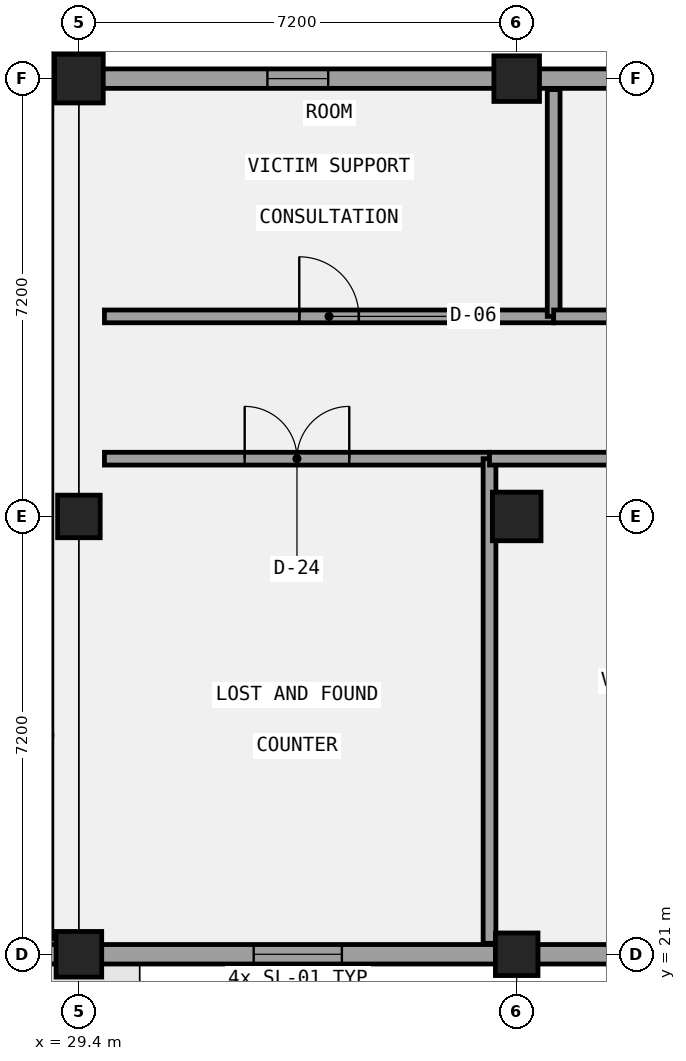
"""IFC4 building model, lengths in metres.
Left out: names, types, materials, properties, quantities, classifications, styles, units other than length and angle.
Written with IfcOpenShell. Run it as: python <this file> out.ifc"""

import sys

from ifc_helpers import new_model, si_unit, direction, frame, frame_2d, origin, origin_2d, place, context, subcontext, project, spatial, rectangle, circle, extrude, element, fill, save


model = new_model("IFC4")
c1 = context("Model", 3, precision=1e-05, world=origin(), true_north=direction((0.0, 1.0)))
c2 = subcontext(c1, "Body", "Model", "MODEL_VIEW")
j1 = project(units=[si_unit("LENGTHUNIT", "METRE"), si_unit("PLANEANGLEUNIT", "RADIAN")], contexts=[c1])
p1 = place(None, origin())
s1 = spatial("IfcSite", under=j1, at=p1, CompositionType="ELEMENT")
p2 = place(p1, origin())
s2 = spatial("IfcBuilding", under=s1, at=p2, CompositionType="ELEMENT")
p3 = place(p2, origin())
s3 = spatial("IfcBuildingStorey", under=s2, at=p3, CompositionType="ELEMENT", Elevation=0.0)
p4 = place(p3, frame((29.4, 21.0, 0.0), z_axis=(0.0, 0.0, 1.0), x_axis=(1.0, 0.0, 0.0)))
e1 = element("IfcColumn", 1, at=p4, inside=s3, PredefinedType="COLUMN", context=c2, shape_type="SweptSolid", body=[
    extrude(rectangle(XDim=0.75, YDim=0.75, at=origin_2d()), origin(), (0.0, 0.0, 1.0), 5.4),
])
p5 = place(p3, frame((29.4, 28.2, 0.0), z_axis=(0.0, 0.0, 1.0), x_axis=(1.0, 0.0, 0.0)))
e2 = element("IfcColumn", 2, at=p5, inside=s3, PredefinedType="COLUMN", context=c2, shape_type="SweptSolid", body=[
    extrude(rectangle(XDim=0.7, YDim=0.7, at=origin_2d()), origin(), (0.0, 0.0, 1.0), 5.4),
])
p6 = place(p3, frame((29.4, 35.4, 0.0), z_axis=(0.0, 0.0, 1.0), x_axis=(1.0, 0.0, 0.0)))
e3 = element("IfcColumn", 3, at=p6, inside=s3, PredefinedType="COLUMN", context=c2, shape_type="SweptSolid", body=[
    extrude(circle(Radius=0.4, at=origin_2d()), origin(), (0.0, 0.0, 1.0), 5.4),
])
p7 = place(p3, frame((36.6, 21.0, 0.0), z_axis=(0.0, 0.0, 1.0), x_axis=(1.0, 0.0, 0.0)))
e4 = element("IfcColumn", 4, at=p7, inside=s3, PredefinedType="COLUMN", context=c2, shape_type="SweptSolid", body=[
    extrude(rectangle(XDim=0.7, YDim=0.7, at=origin_2d()), origin(), (0.0, 0.0, 1.0), 5.4),
])
p8 = place(p3, frame((36.6, 28.2, 0.0), z_axis=(0.0, 0.0, 1.0), x_axis=(1.0, 0.0, 0.0)))
e5 = element("IfcColumn", 5, at=p8, inside=s3, PredefinedType="COLUMN", context=c2, shape_type="SweptSolid", body=[
    extrude(rectangle(XDim=0.8, YDim=0.8, at=origin_2d()), origin(), (0.0, 0.0, 1.0), 5.4),
])
p9 = place(p3, frame((36.6, 35.4, 0.0), z_axis=(0.0, 0.0, 1.0), x_axis=(1.0, 0.0, 0.0)))
e6 = element("IfcColumn", 6, at=p9, inside=s3, PredefinedType="COLUMN", context=c2, shape_type="SweptSolid", body=[
    extrude(rectangle(XDim=0.75, YDim=0.75, at=origin_2d()), origin(), (0.0, 0.0, 1.0), 5.4),
])
p10 = place(p3, frame((-0.16, 21.0, 0.0), z_axis=(0.0, 0.0, 1.0), x_axis=(1.0, 0.0, 0.0)))
e7 = element("IfcWall", 7, at=p10, inside=s3, PredefinedType="SOLIDWALL", context=c2, shape_type="SweptSolid", body=[
    extrude(rectangle(XDim=29.72, YDim=0.32, at=frame_2d((14.86, 0.0))), origin(), (0.0, 0.0, 1.0), 3.35),
])
p11 = place(p10, frame((23.56, 0.0, 0.0)))
e8 = element("IfcOpeningElement", 8, at=p11, cuts=e7, PredefinedType="OPENING", context=c2, shape_type="SweptSolid", body=[
    extrude(rectangle(XDim=4.8, YDim=3.1, at=frame_2d((2.4, 1.55))), frame((0.0, 0.17, 0.0), z_axis=(0.0, -1.0, 0.0), x_axis=(1.0, 0.0, 0.0)), (0.0, 0.0, 1.0), 0.34),
])
p12 = place(p10, frame((3.335, 0.0, 1.0)))
e9 = element("IfcOpeningElement", 9, at=p12, cuts=e7, PredefinedType="OPENING", context=c2, shape_type="SweptSolid", body=[
    extrude(rectangle(XDim=1.45, YDim=1.4, at=frame_2d((0.725, 0.7))), frame((0.0, 0.17, 0.0), z_axis=(0.0, -1.0, 0.0), x_axis=(1.0, 0.0, 0.0)), (0.0, 0.0, 1.0), 0.34),
])
p13 = place(p10, frame((10.835, 0.0, 1.0)))
e10 = element("IfcOpeningElement", 10, at=p13, cuts=e7, PredefinedType="OPENING", context=c2, shape_type="SweptSolid", body=[
    extrude(rectangle(XDim=1.45, YDim=1.4, at=frame_2d((0.725, 0.7))), frame((0.0, 0.17, 0.0), z_axis=(0.0, -1.0, 0.0), x_axis=(1.0, 0.0, 0.0)), (0.0, 0.0, 1.0), 0.34),
])
p14 = place(p10, frame((18.035, 0.0, 1.0)))
e11 = element("IfcOpeningElement", 11, at=p14, cuts=e7, PredefinedType="OPENING", context=c2, shape_type="SweptSolid", body=[
    extrude(rectangle(XDim=1.45, YDim=1.4, at=frame_2d((0.725, 0.7))), frame((0.0, 0.17, 0.0), z_axis=(0.0, -1.0, 0.0), x_axis=(1.0, 0.0, 0.0)), (0.0, 0.0, 1.0), 0.34),
])
p15 = place(p3, frame((29.24, 21.0, 0.0), z_axis=(0.0, 0.0, 1.0), x_axis=(1.0, 0.0, 0.0)))
e12 = element("IfcWall", 12, at=p15, inside=s3, PredefinedType="SOLIDWALL", context=c2, shape_type="SweptSolid", body=[
    extrude(rectangle(XDim=50.72, YDim=0.32, at=frame_2d((25.36, 0.0))), origin(), (0.0, 0.0, 1.0), 3.35),
])
p16 = place(p15, frame((24.36, 0.0, 0.0)))
e13 = element("IfcOpeningElement", 13, at=p16, cuts=e12, PredefinedType="OPENING", context=c2, shape_type="SweptSolid", body=[
    extrude(rectangle(XDim=2.0, YDim=2.6, at=frame_2d((1.0, 1.3))), frame((0.0, 0.17, 0.0), z_axis=(0.0, -1.0, 0.0), x_axis=(1.0, 0.0, 0.0)), (0.0, 0.0, 1.0), 0.34),
])
p17 = place(p15, frame((3.035, 0.0, 1.0)))
e14 = element("IfcOpeningElement", 14, at=p17, cuts=e12, PredefinedType="OPENING", context=c2, shape_type="SweptSolid", body=[
    extrude(rectangle(XDim=1.45, YDim=1.65, at=frame_2d((0.725, 0.825))), frame((0.0, 0.17, 0.0), z_axis=(0.0, -1.0, 0.0), x_axis=(1.0, 0.0, 0.0)), (0.0, 0.0, 1.0), 0.34),
])
p18 = place(p15, frame((10.235, 0.0, 1.0)))
e15 = element("IfcOpeningElement", 15, at=p18, cuts=e12, PredefinedType="OPENING", context=c2, shape_type="SweptSolid", body=[
    extrude(rectangle(XDim=1.45, YDim=1.65, at=frame_2d((0.725, 0.825))), frame((0.0, 0.17, 0.0), z_axis=(0.0, -1.0, 0.0), x_axis=(1.0, 0.0, 0.0)), (0.0, 0.0, 1.0), 0.34),
])
p19 = place(p15, frame((17.435, 0.0, 1.0)))
e16 = element("IfcOpeningElement", 16, at=p19, cuts=e12, PredefinedType="OPENING", context=c2, shape_type="SweptSolid", body=[
    extrude(rectangle(XDim=1.45, YDim=1.65, at=frame_2d((0.725, 0.825))), frame((0.0, 0.17, 0.0), z_axis=(0.0, -1.0, 0.0), x_axis=(1.0, 0.0, 0.0)), (0.0, 0.0, 1.0), 0.34),
])
p20 = place(p15, frame((31.835, 0.0, 1.0)))
e17 = element("IfcOpeningElement", 17, at=p20, cuts=e12, PredefinedType="OPENING", context=c2, shape_type="SweptSolid", body=[
    extrude(rectangle(XDim=1.45, YDim=1.65, at=frame_2d((0.725, 0.825))), frame((0.0, 0.17, 0.0), z_axis=(0.0, -1.0, 0.0), x_axis=(1.0, 0.0, 0.0)), (0.0, 0.0, 1.0), 0.34),
])
p21 = place(p15, frame((39.035, 0.0, 1.0)))
e18 = element("IfcOpeningElement", 18, at=p21, cuts=e12, PredefinedType="OPENING", context=c2, shape_type="SweptSolid", body=[
    extrude(rectangle(XDim=1.45, YDim=1.65, at=frame_2d((0.725, 0.825))), frame((0.0, 0.17, 0.0), z_axis=(0.0, -1.0, 0.0), x_axis=(1.0, 0.0, 0.0)), (0.0, 0.0, 1.0), 0.34),
])
p22 = place(p15, frame((46.235, 0.0, 1.0)))
e19 = element("IfcOpeningElement", 19, at=p22, cuts=e12, PredefinedType="OPENING", context=c2, shape_type="SweptSolid", body=[
    extrude(rectangle(XDim=1.45, YDim=1.65, at=frame_2d((0.725, 0.825))), frame((0.0, 0.17, 0.0), z_axis=(0.0, -1.0, 0.0), x_axis=(1.0, 0.0, 0.0)), (0.0, 0.0, 1.0), 0.34),
])
p23 = place(p3, frame((29.4, 35.56, 0.0), z_axis=(0.0, 0.0, 1.0), x_axis=(0.0, 1.0, 0.0)))
e20 = element("IfcWall", 20, at=p23, inside=s3, PredefinedType="SOLIDWALL", context=c2, shape_type="SweptSolid", body=[
    extrude(rectangle(XDim=21.28, YDim=0.32, at=frame_2d((10.64, 0.0))), origin(), (0.0, 0.0, 1.0), 4.22),
])
p24 = place(p23, frame((3.095, 0.0, 1.0)))
e21 = element("IfcOpeningElement", 21, at=p24, cuts=e20, PredefinedType="OPENING", context=c2, shape_type="SweptSolid", body=[
    extrude(rectangle(XDim=0.85, YDim=2.15, at=frame_2d((0.425, 1.075))), frame((0.0, 0.17, 0.0), z_axis=(0.0, -1.0, 0.0), x_axis=(1.0, 0.0, 0.0)), (0.0, 0.0, 1.0), 0.34),
])
p25 = place(p23, frame((10.215, 0.0, 1.0)))
e22 = element("IfcOpeningElement", 22, at=p25, cuts=e20, PredefinedType="OPENING", context=c2, shape_type="SweptSolid", body=[
    extrude(rectangle(XDim=0.85, YDim=2.15, at=frame_2d((0.425, 1.075))), frame((0.0, 0.17, 0.0), z_axis=(0.0, -1.0, 0.0), x_axis=(1.0, 0.0, 0.0)), (0.0, 0.0, 1.0), 0.34),
])
p26 = place(p23, frame((17.335, 0.0, 1.0)))
e23 = element("IfcOpeningElement", 23, at=p26, cuts=e20, PredefinedType="OPENING", context=c2, shape_type="SweptSolid", body=[
    extrude(rectangle(XDim=0.85, YDim=2.15, at=frame_2d((0.425, 1.075))), frame((0.0, 0.17, 0.0), z_axis=(0.0, -1.0, 0.0), x_axis=(1.0, 0.0, 0.0)), (0.0, 0.0, 1.0), 0.34),
])
p27 = place(p3, frame((72.76, 35.4, 0.0), z_axis=(0.0, 0.0, 1.0), x_axis=(-1.0, 0.0, 0.0)))
e24 = element("IfcWall", 24, at=p27, inside=s3, PredefinedType="SOLIDWALL", context=c2, shape_type="SweptSolid", body=[
    extrude(rectangle(XDim=43.52, YDim=0.32, at=frame_2d((21.76, 0.0))), origin(), (0.0, 0.0, 1.0), 4.12),
])
p28 = place(p27, frame((39.26, 0.0, 1.0)))
e25 = element("IfcOpeningElement", 25, at=p28, cuts=e24, PredefinedType="OPENING", context=c2, shape_type="SweptSolid", body=[
    extrude(rectangle(XDim=1.0, YDim=1.9, at=frame_2d((0.5, 0.95))), frame((0.0, 0.17, 0.0), z_axis=(0.0, -1.0, 0.0), x_axis=(1.0, 0.0, 0.0)), (0.0, 0.0, 1.0), 0.34),
])
p29 = place(p27, frame((32.06, 0.0, 1.0)))
e26 = element("IfcOpeningElement", 26, at=p29, cuts=e24, PredefinedType="OPENING", context=c2, shape_type="SweptSolid", body=[
    extrude(rectangle(XDim=1.0, YDim=1.9, at=frame_2d((0.5, 0.95))), frame((0.0, 0.17, 0.0), z_axis=(0.0, -1.0, 0.0), x_axis=(1.0, 0.0, 0.0)), (0.0, 0.0, 1.0), 0.34),
])
p30 = place(p27, frame((24.86, 0.0, 1.0)))
e27 = element("IfcOpeningElement", 27, at=p30, cuts=e24, PredefinedType="OPENING", context=c2, shape_type="SweptSolid", body=[
    extrude(rectangle(XDim=1.0, YDim=1.9, at=frame_2d((0.5, 0.95))), frame((0.0, 0.17, 0.0), z_axis=(0.0, -1.0, 0.0), x_axis=(1.0, 0.0, 0.0)), (0.0, 0.0, 1.0), 0.34),
])
p31 = place(p27, frame((17.66, 0.0, 1.0)))
e28 = element("IfcOpeningElement", 28, at=p31, cuts=e24, PredefinedType="OPENING", context=c2, shape_type="SweptSolid", body=[
    extrude(rectangle(XDim=1.0, YDim=1.9, at=frame_2d((0.5, 0.95))), frame((0.0, 0.17, 0.0), z_axis=(0.0, -1.0, 0.0), x_axis=(1.0, 0.0, 0.0)), (0.0, 0.0, 1.0), 0.34),
])
p32 = place(p27, frame((10.46, 0.0, 1.0)))
e29 = element("IfcOpeningElement", 29, at=p32, cuts=e24, PredefinedType="OPENING", context=c2, shape_type="SweptSolid", body=[
    extrude(rectangle(XDim=1.0, YDim=1.9, at=frame_2d((0.5, 0.95))), frame((0.0, 0.17, 0.0), z_axis=(0.0, -1.0, 0.0), x_axis=(1.0, 0.0, 0.0)), (0.0, 0.0, 1.0), 0.34),
])
p33 = place(p27, frame((3.26, 0.0, 1.0)))
e30 = element("IfcOpeningElement", 30, at=p33, cuts=e24, PredefinedType="OPENING", context=c2, shape_type="SweptSolid", body=[
    extrude(rectangle(XDim=1.0, YDim=1.9, at=frame_2d((0.5, 0.95))), frame((0.0, 0.17, 0.0), z_axis=(0.0, -1.0, 0.0), x_axis=(1.0, 0.0, 0.0)), (0.0, 0.0, 1.0), 0.34),
])
p34 = place(p3, frame((29.82, 29.15, 0.0), z_axis=(0.0, 0.0, 1.0), x_axis=(1.0, 0.0, 0.0)))
e31 = element("IfcWall", 31, at=p34, inside=s3, PredefinedType="PARTITIONING", context=c2, shape_type="SweptSolid", body=[
    extrude(rectangle(XDim=6.333, YDim=0.21, at=frame_2d((3.167, 0.0))), origin(), (0.0, 0.0, 1.0), 5.12),
])
p35 = place(p34, frame((2.306, 0.0, 0.0)))
e32 = element("IfcOpeningElement", 32, at=p35, cuts=e31, PredefinedType="OPENING", context=c2, shape_type="SweptSolid", body=[
    extrude(rectangle(XDim=1.72, YDim=2.35, at=frame_2d((0.86, 1.175))), frame((0.0, 0.115, 0.0), z_axis=(0.0, -1.0, 0.0), x_axis=(1.0, 0.0, 0.0)), (0.0, 0.0, 1.0), 0.23),
])
p36 = place(p3, frame((36.153, 21.18, 0.0), z_axis=(0.0, 0.0, 1.0), x_axis=(0.0, 1.0, 0.0)))
e33 = element("IfcWall", 33, at=p36, inside=s3, PredefinedType="PARTITIONING", context=c2, shape_type="SweptSolid", body=[
    extrude(rectangle(XDim=7.97, YDim=0.21, at=frame_2d((3.985, 0.0))), origin(), (0.0, 0.0, 1.0), 5.12),
])
p37 = place(p3, frame((36.153, 29.15, 0.0), z_axis=(0.0, 0.0, 1.0), x_axis=(1.0, 0.0, 0.0)))
e34 = element("IfcWall", 34, at=p37, inside=s3, PredefinedType="PARTITIONING", context=c2, shape_type="SweptSolid", body=[
    extrude(rectangle(XDim=6.333, YDim=0.21, at=frame_2d((3.167, 0.0))), origin(), (0.0, 0.0, 1.0), 5.12),
])
p38 = place(p37, frame((2.707, 0.0, 0.0)))
e35 = element("IfcOpeningElement", 35, at=p38, cuts=e34, PredefinedType="OPENING", context=c2, shape_type="SweptSolid", body=[
    extrude(rectangle(XDim=0.92, YDim=2.1, at=frame_2d((0.46, 1.05))), frame((0.0, 0.115, 0.0), z_axis=(0.0, -1.0, 0.0), x_axis=(1.0, 0.0, 0.0)), (0.0, 0.0, 1.0), 0.23),
])
p39 = place(p3, frame((29.82, 31.49, 0.0), z_axis=(0.0, 0.0, 1.0), x_axis=(1.0, 0.0, 0.0)))
e36 = element("IfcWall", 36, at=p39, inside=s3, PredefinedType="PARTITIONING", context=c2, shape_type="SweptSolid", body=[
    extrude(rectangle(XDim=7.388, YDim=0.21, at=frame_2d((3.694, 0.0))), origin(), (0.0, 0.0, 1.0), 5.12),
])
p40 = place(p39, frame((3.204, 0.0, 0.0)))
e37 = element("IfcOpeningElement", 37, at=p40, cuts=e36, PredefinedType="OPENING", context=c2, shape_type="SweptSolid", body=[
    extrude(rectangle(XDim=0.98, YDim=2.35, at=frame_2d((0.49, 1.175))), frame((0.0, 0.115, 0.0), z_axis=(0.0, -1.0, 0.0), x_axis=(1.0, 0.0, 0.0)), (0.0, 0.0, 1.0), 0.23),
])
p41 = place(p3, frame((37.208, 31.49, 0.0), z_axis=(0.0, 0.0, 1.0), x_axis=(0.0, 1.0, 0.0)))
e38 = element("IfcWall", 38, at=p41, inside=s3, PredefinedType="PARTITIONING", context=c2, shape_type="SweptSolid", body=[
    extrude(rectangle(XDim=3.73, YDim=0.21, at=frame_2d((1.865, 0.0))), origin(), (0.0, 0.0, 1.0), 5.12),
])
p42 = place(p3, frame((37.208, 31.49, 0.0), z_axis=(0.0, 0.0, 1.0), x_axis=(1.0, 0.0, 0.0)))
e39 = element("IfcWall", 39, at=p42, inside=s3, PredefinedType="PARTITIONING", context=c2, shape_type="SweptSolid", body=[
    extrude(rectangle(XDim=7.389, YDim=0.21, at=frame_2d((3.694, 0.0))), origin(), (0.0, 0.0, 1.0), 5.12),
])
p43 = place(p42, frame((3.175, 0.0, 0.0)))
e40 = element("IfcOpeningElement", 40, at=p43, cuts=e39, PredefinedType="OPENING", context=c2, shape_type="SweptSolid", body=[
    extrude(rectangle(XDim=1.04, YDim=2.1, at=frame_2d((0.52, 1.05))), frame((0.0, 0.115, 0.0), z_axis=(0.0, -1.0, 0.0), x_axis=(1.0, 0.0, 0.0)), (0.0, 0.0, 1.0), 0.23),
])
p44 = place(p17, origin())
e41 = element("IfcWindow", 41, at=p44, inside=s3, PartitioningType="SINGLE_PANEL", PredefinedType="WINDOW", context=c2, shape_type="SweptSolid", body=[
    extrude(rectangle(XDim=1.45, YDim=1.65, at=frame_2d((0.725, 0.825))), frame((0.0, 0.03, 0.0), z_axis=(0.0, -1.0, 0.0), x_axis=(1.0, 0.0, 0.0)), (0.0, 0.0, 1.0), 0.06),
])
fill(e14, e41)
p45 = place(p28, origin())
e42 = element("IfcWindow", 42, at=p45, inside=s3, PartitioningType="SINGLE_PANEL", PredefinedType="WINDOW", context=c2, shape_type="SweptSolid", body=[
    extrude(rectangle(XDim=1.0, YDim=1.9, at=frame_2d((0.5, 0.95))), frame((0.0, 0.03, 0.0), z_axis=(0.0, -1.0, 0.0), x_axis=(1.0, 0.0, 0.0)), (0.0, 0.0, 1.0), 0.06),
])
fill(e25, e42)
p46 = place(p35, frame((1.72, 0.0, 0.0), z_axis=(0.0, 0.0, 1.0), x_axis=(-1.0, 0.0, 0.0)))
e43 = element("IfcDoor", 43, at=p46, inside=s3, OperationType="DOUBLE_DOOR_SINGLE_SWING", PredefinedType="DOOR", context=c2, shape_type="SweptSolid", body=[
    extrude(rectangle(XDim=1.72, YDim=2.35, at=frame_2d((0.86, 1.175))), frame((0.0, 0.025, 0.0), z_axis=(0.0, -1.0, 0.0), x_axis=(1.0, 0.0, 0.0)), (0.0, 0.0, 1.0), 0.05),
])
fill(e32, e43)
p47 = place(p40, origin())
e44 = element("IfcDoor", 44, at=p47, inside=s3, OperationType="SINGLE_SWING_LEFT", PredefinedType="DOOR", context=c2, shape_type="SweptSolid", body=[
    extrude(rectangle(XDim=0.98, YDim=2.35, at=frame_2d((0.49, 1.175))), frame((0.0, 0.025, 0.0), z_axis=(0.0, -1.0, 0.0), x_axis=(1.0, 0.0, 0.0)), (0.0, 0.0, 1.0), 0.05),
])
fill(e37, e44)
save(model, sys.argv[1])
